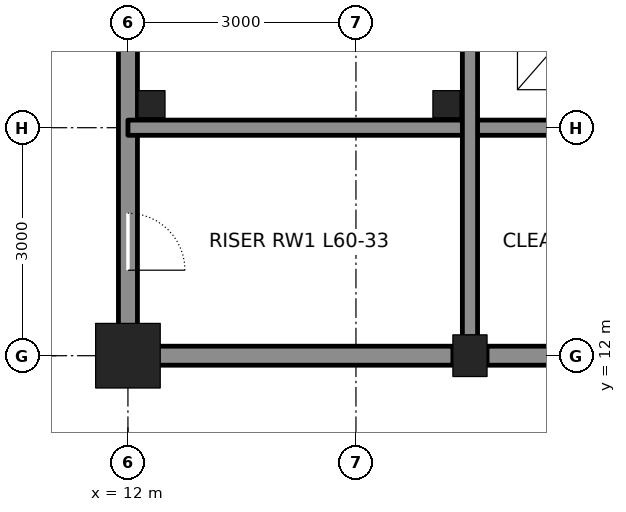
"""IFC4 building model, lengths in metres.
Left out: names, types, materials, properties, quantities, classifications, styles, units other than length and angle.
Written with IfcOpenShell. Run it as: python <this file> out.ifc"""

import sys

from ifc_helpers import new_model, si_unit, direction, frame, frame_2d, origin, origin_2d, place, context, subcontext, project, spatial, rectangle, hollow_rectangle, i_section, extrude, element, fill, save


model = new_model("IFC4")
c1 = context("Model", 3, precision=1e-05, world=origin(), true_north=direction((0.0, 1.0)))
c2 = subcontext(c1, "Body", "Model", "MODEL_VIEW")
j1 = project(units=[si_unit("LENGTHUNIT", "METRE"), si_unit("PLANEANGLEUNIT", "RADIAN")], contexts=[c1])
p1 = place(None, origin())
s1 = spatial("IfcSite", under=j1, at=p1, CompositionType="ELEMENT")
p2 = place(p1, origin())
s2 = spatial("IfcBuilding", under=s1, at=p2, CompositionType="ELEMENT")
p3 = place(p2, frame((0.0, 0.0, 270.6)))
s3 = spatial("IfcBuildingStorey", under=s2, at=p3, CompositionType="ELEMENT", Elevation=270.6)
p4 = place(p3, frame((12.0, 12.0, 0.0), z_axis=(0.0, 0.0, 1.0), x_axis=(1.0, 0.0, 0.0)))
e1 = element("IfcColumn", 1, at=p4, inside=s3, PredefinedType="COLUMN", context=c2, shape_type="SweptSolid", body=[
    extrude(hollow_rectangle(XDim=0.85, YDim=0.85, WallThickness=0.085, at=origin_2d()), origin(), (0.0, 0.0, 1.0), 4.2),
])
p5 = place(p3, frame((16.5, 12.0, 0.0), z_axis=(0.0, 0.0, 1.0), x_axis=(1.0, 0.0, 0.0)))
e2 = element("IfcColumn", 2, at=p5, inside=s3, PredefinedType="COLUMN", context=c2, shape_type="SweptSolid", body=[
    extrude(i_section(OverallWidth=0.449, OverallDepth=0.549, WebThickness=0.072, FlangeThickness=0.115, at=origin_2d()), origin(), (0.0, 0.0, 1.0), 4.2),
])
p6 = place(p3, frame((12.0, 12.25, 0.0), z_axis=(0.0, 0.0, 1.0), x_axis=(0.0, 1.0, 0.0)))
e3 = element("IfcWall", 3, at=p6, inside=s3, PredefinedType="SOLIDWALL", context=c2, shape_type="SweptSolid", body=[
    extrude(rectangle(XDim=8.5, YDim=0.25, at=frame_2d((4.25, 0.0))), origin(), (0.0, 0.0, 1.0), 3.113),
])
p7 = place(p6, frame((0.875, 0.0, 0.0)))
e4 = element("IfcOpeningElement", 4, at=p7, cuts=e3, PredefinedType="OPENING", context=c2, shape_type="SweptSolid", body=[
    extrude(rectangle(XDim=0.75, YDim=2.1, at=frame_2d((0.375, 1.05))), frame((0.0, 0.135, 0.0), z_axis=(0.0, -1.0, 0.0), x_axis=(1.0, 0.0, 0.0)), (0.0, 0.0, 1.0), 0.27),
])
p8 = place(p3, frame((12.25, 12.0, 0.0), z_axis=(0.0, 0.0, 1.0), x_axis=(1.0, 0.0, 0.0)))
e5 = element("IfcWall", 5, at=p8, inside=s3, PredefinedType="SOLIDWALL", context=c2, shape_type="SweptSolid", body=[
    extrude(rectangle(XDim=4.025, YDim=0.25, at=frame_2d((2.013, 0.0))), origin(), (0.0, 0.0, 1.0), 3.181),
])
p9 = place(p3, frame((16.725, 12.0, 0.0), z_axis=(0.0, 0.0, 1.0), x_axis=(1.0, 0.0, 0.0)))
e6 = element("IfcWall", 6, at=p9, inside=s3, PredefinedType="SOLIDWALL", context=c2, shape_type="SweptSolid", body=[
    extrude(rectangle(XDim=2.55, YDim=0.25, at=frame_2d((1.275, 0.0))), origin(), (0.0, 0.0, 1.0), 3.181),
])
p10 = place(p3, frame((12.0, 15.0, 0.0), z_axis=(0.0, 0.0, 1.0), x_axis=(1.0, 0.0, 0.0)))
e7 = element("IfcWall", 7, at=p10, inside=s3, PredefinedType="SOLIDWALL", context=c2, shape_type="SweptSolid", body=[
    extrude(rectangle(XDim=7.5, YDim=0.2, at=frame_2d((3.75, 0.0))), origin(), (0.0, 0.0, 1.0), 4.04),
])
p11 = place(p3, frame((16.5, 12.25, 0.0), z_axis=(0.0, 0.0, 1.0), x_axis=(0.0, 1.0, 0.0)))
e8 = element("IfcWall", 8, at=p11, inside=s3, PredefinedType="SOLIDWALL", context=c2, shape_type="SweptSolid", body=[
    extrude(rectangle(XDim=8.5, YDim=0.2, at=frame_2d((4.25, 0.0))), origin(), (0.0, 0.0, 1.0), 3.113),
])
for number, where, z_axis, x_axis in (
    (9, (12.31, 15.31, 0.0), (0.0, 0.0, 1.0), (1.0, 0.0, 0.0)),
    (10, (16.19, 15.31, 0.0), (0.0, 0.0, 1.0), (1.0, 0.0, 0.0)),
):
    element("IfcColumn", number, at=place(p3, frame(where, z_axis=z_axis, x_axis=x_axis)), inside=s3, PredefinedType="COLUMN", context=c2, shape_type="SweptSolid", body=[
        extrude(hollow_rectangle(XDim=0.356, YDim=0.356, WallThickness=0.009, at=origin_2d()), origin(), (0.0, 0.0, 1.0), 4.2),
    ])
p12 = place(p7, frame((0.75, 0.0, 0.0), z_axis=(0.0, 0.0, 1.0), x_axis=(-1.0, 0.0, 0.0)))
e11 = element("IfcDoor", 11, at=p12, inside=s3, OperationType="SINGLE_SWING_RIGHT", PredefinedType="DOOR", context=c2, shape_type="SweptSolid", body=[
    extrude(rectangle(XDim=0.75, YDim=2.1, at=frame_2d((0.375, 1.05))), frame((0.0, 0.025, 0.0), z_axis=(0.0, -1.0, 0.0), x_axis=(1.0, 0.0, 0.0)), (0.0, 0.0, 1.0), 0.05),
])
fill(e4, e11)
save(model, sys.argv[1])
